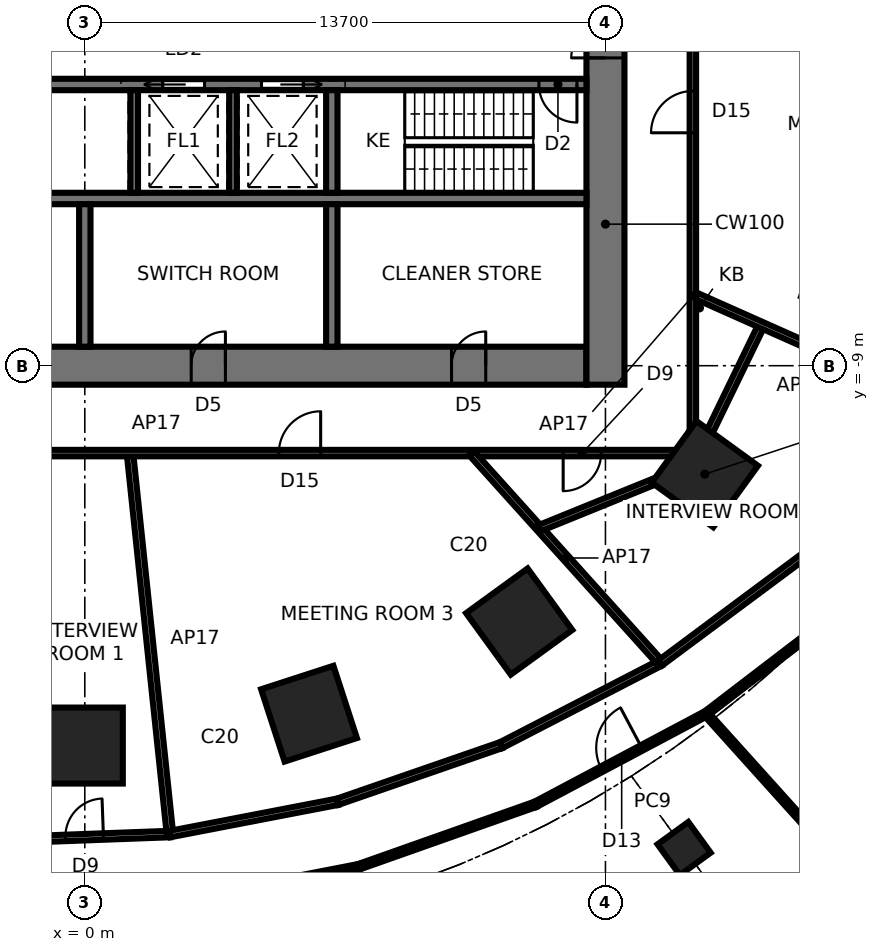
"""IFC4 building model, lengths in metres.
Left out: names, types, materials, properties, quantities, classifications, styles, units other than length and angle.
Written with IfcOpenShell. Run it as: python <this file> out.ifc"""

import sys

from ifc_helpers import new_model, si_unit, direction, frame, frame_2d, origin, origin_2d, place, context, subcontext, project, spatial, rectangle, extrude, element, fill, save


model = new_model("IFC4")
c1 = context("Model", 3, precision=1e-05, world=origin(), true_north=direction((0.0, 1.0)))
c2 = subcontext(c1, "Body", "Model", "MODEL_VIEW")
j1 = project(units=[si_unit("LENGTHUNIT", "METRE"), si_unit("PLANEANGLEUNIT", "RADIAN")], contexts=[c1])
p1 = place(None, origin())
s1 = spatial("IfcSite", under=j1, at=p1, CompositionType="ELEMENT")
p2 = place(p1, origin())
s2 = spatial("IfcBuilding", under=s1, at=p2, CompositionType="ELEMENT")
p3 = place(p2, frame((0.0, 0.0, 5.6)))
s3 = spatial("IfcBuildingStorey", under=s2, at=p3, CompositionType="ELEMENT", Elevation=5.6)
for number, where, z_axis, x_axis in (
    (1, (0.0, -18.996, 0.0), (0.0, 0.0, 1.0), (0.0, -1.0, 0.0)),
    (2, (5.9, -18.157, 0.0), (0.0, 0.0, 1.0), (0.309, -0.951, 0.0)),
    (3, (11.43, -15.733, 0.0), (0.0, 0.0, 1.0), (0.588, -0.809, 0.0)),
    (4, (16.315, -11.854, 0.0), (0.0, 0.0, 1.0), (0.809, -0.588, 0.0)),
):
    element("IfcColumn", number, at=place(p3, frame(where, z_axis=z_axis, x_axis=x_axis)), inside=s3, PredefinedType="COLUMN", context=c2, shape_type="SweptSolid", body=[
        extrude(rectangle(XDim=2.0, YDim=2.0, at=origin_2d()), origin(), (0.0, 0.0, 1.0), 5.0),
    ])
p4 = place(p3, frame((15.77, -21.705, 0.0), z_axis=(0.0, 0.0, 1.0), x_axis=(0.587785252292, -0.809016994375, 0.0)))
e5 = element("IfcColumn", 5, at=p4, inside=s3, PredefinedType="COLUMN", context=c2, shape_type="SweptSolid", body=[
    extrude(rectangle(XDim=1.0, YDim=1.0, at=origin_2d()), origin(), (0.0, 0.0, 1.0), 5.0),
])
p5 = place(p3, frame((-13.2, -9.0, 0.0), z_axis=(0.0, 0.0, 1.0), x_axis=(1.0, 0.0, 0.0)))
e6 = element("IfcWall", 6, at=p5, inside=s3, PredefinedType="SHEAR", context=c2, shape_type="SweptSolid", body=[
    extrude(rectangle(XDim=26.4, YDim=1.0, at=frame_2d((13.2, 0.0))), origin(), (0.0, 0.0, 1.0), 5.0),
])
p6 = place(p5, frame((0.2, 0.0, 0.0)))
e7 = element("IfcOpeningElement", 7, at=p6, cuts=e6, PredefinedType="OPENING", context=c2, shape_type="SweptSolid", body=[
    extrude(rectangle(XDim=1.0, YDim=2.1, at=frame_2d((0.5, 1.05))), frame((0.0, 0.51, 0.0), z_axis=(0.0, -1.0, 0.0), x_axis=(1.0, 0.0, 0.0)), (0.0, 0.0, 1.0), 1.02),
])
p7 = place(p5, frame((9.5, 0.0, 0.0)))
e8 = element("IfcOpeningElement", 8, at=p7, cuts=e6, PredefinedType="OPENING", context=c2, shape_type="SweptSolid", body=[
    extrude(rectangle(XDim=0.9, YDim=2.1, at=frame_2d((0.45, 1.05))), frame((0.0, 0.51, 0.0), z_axis=(0.0, -1.0, 0.0), x_axis=(1.0, 0.0, 0.0)), (0.0, 0.0, 1.0), 1.02),
])
p8 = place(p5, frame((16.0, 0.0, 0.0)))
e9 = element("IfcOpeningElement", 9, at=p8, cuts=e6, PredefinedType="OPENING", context=c2, shape_type="SweptSolid", body=[
    extrude(rectangle(XDim=0.9, YDim=2.1, at=frame_2d((0.45, 1.05))), frame((0.0, 0.51, 0.0), z_axis=(0.0, -1.0, 0.0), x_axis=(1.0, 0.0, 0.0)), (0.0, 0.0, 1.0), 1.02),
])
p9 = place(p5, frame((22.85, 0.0, 0.0)))
e10 = element("IfcOpeningElement", 10, at=p9, cuts=e6, PredefinedType="OPENING", context=c2, shape_type="SweptSolid", body=[
    extrude(rectangle(XDim=0.9, YDim=2.1, at=frame_2d((0.45, 1.05))), frame((0.0, 0.51, 0.0), z_axis=(0.0, -1.0, 0.0), x_axis=(1.0, 0.0, 0.0)), (0.0, 0.0, 1.0), 1.02),
])
p10 = place(p3, frame((13.7, -9.5, 0.0), z_axis=(0.0, 0.0, 1.0), x_axis=(0.0, 1.0, 0.0)))
e11 = element("IfcWall", 11, at=p10, inside=s3, PredefinedType="SHEAR", context=c2, shape_type="SweptSolid", body=[
    extrude(rectangle(XDim=19.0, YDim=1.0, at=frame_2d((9.5, 0.0))), origin(), (0.0, 0.0, 1.0), 5.0),
])
p11 = place(p10, frame((8.6, 0.0, 0.0)))
e12 = element("IfcOpeningElement", 12, at=p11, cuts=e11, PredefinedType="OPENING", context=c2, shape_type="SweptSolid", body=[
    extrude(rectangle(XDim=1.8, YDim=2.4, at=frame_2d((0.9, 1.2))), frame((0.0, 0.51, 0.0), z_axis=(0.0, -1.0, 0.0), x_axis=(1.0, 0.0, 0.0)), (0.0, 0.0, 1.0), 1.02),
])
p12 = place(p3, frame((-13.2, -1.6, 0.0), z_axis=(0.0, 0.0, 1.0), x_axis=(1.0, 0.0, 0.0)))
e13 = element("IfcWall", 13, at=p12, inside=s3, PredefinedType="SHEAR", context=c2, shape_type="SweptSolid", body=[
    extrude(rectangle(XDim=26.4, YDim=0.3, at=frame_2d((13.2, 0.0))), origin(), (0.0, 0.0, 1.0), 5.0),
])
p13 = place(p12, frame((25.15, 0.0, 0.0)))
e14 = element("IfcOpeningElement", 14, at=p13, cuts=e13, PredefinedType="OPENING", context=c2, shape_type="SweptSolid", body=[
    extrude(rectangle(XDim=1.0, YDim=2.1, at=frame_2d((0.5, 1.05))), frame((0.0, 0.16, 0.0), z_axis=(0.0, -1.0, 0.0), x_axis=(1.0, 0.0, 0.0)), (0.0, 0.0, 1.0), 0.32),
])
p14 = place(p12, frame((15.25, 0.0, 0.0)))
e15 = element("IfcOpeningElement", 15, at=p14, cuts=e13, PredefinedType="OPENING", context=c2, shape_type="SweptSolid", body=[
    extrude(rectangle(XDim=1.1, YDim=2.3, at=frame_2d((0.55, 1.15))), frame((0.0, 0.16, 0.0), z_axis=(0.0, -1.0, 0.0), x_axis=(1.0, 0.0, 0.0)), (0.0, 0.0, 1.0), 0.32),
])
p15 = place(p12, frame((17.85, 0.0, 0.0)))
e16 = element("IfcOpeningElement", 16, at=p15, cuts=e13, PredefinedType="OPENING", context=c2, shape_type="SweptSolid", body=[
    extrude(rectangle(XDim=1.1, YDim=2.3, at=frame_2d((0.55, 1.15))), frame((0.0, 0.16, 0.0), z_axis=(0.0, -1.0, 0.0), x_axis=(1.0, 0.0, 0.0)), (0.0, 0.0, 1.0), 0.32),
])
p16 = place(p12, frame((5.55, 0.0, 0.0)))
e17 = element("IfcOpeningElement", 17, at=p16, cuts=e13, PredefinedType="OPENING", context=c2, shape_type="SweptSolid", body=[
    extrude(rectangle(XDim=0.9, YDim=2.1, at=frame_2d((0.45, 1.05))), frame((0.0, 0.16, 0.0), z_axis=(0.0, -1.0, 0.0), x_axis=(1.0, 0.0, 0.0)), (0.0, 0.0, 1.0), 0.32),
])
p17 = place(p3, frame((-13.2, -4.6, 0.0), z_axis=(0.0, 0.0, 1.0), x_axis=(1.0, 0.0, 0.0)))
e18 = element("IfcWall", 18, at=p17, inside=s3, PredefinedType="SHEAR", context=c2, shape_type="SweptSolid", body=[
    extrude(rectangle(XDim=26.4, YDim=0.3, at=frame_2d((13.2, 0.0))), origin(), (0.0, 0.0, 1.0), 5.0),
])
p18 = place(p3, frame((6.5, -1.75, 0.0), z_axis=(0.0, 0.0, 1.0), x_axis=(0.0, -1.0, 0.0)))
e19 = element("IfcWall", 19, at=p18, inside=s3, PredefinedType="SHEAR", context=c2, shape_type="SweptSolid", body=[
    extrude(rectangle(XDim=2.7, YDim=0.3, at=frame_2d((1.35, 0.0))), origin(), (0.0, 0.0, 1.0), 5.0),
])
p19 = place(p3, frame((6.5, -4.75, 0.0), z_axis=(0.0, 0.0, 1.0), x_axis=(0.0, -1.0, 0.0)))
e20 = element("IfcWall", 20, at=p19, inside=s3, PredefinedType="SHEAR", context=c2, shape_type="SweptSolid", body=[
    extrude(rectangle(XDim=3.75, YDim=0.3, at=frame_2d((1.875, 0.0))), origin(), (0.0, 0.0, 1.0), 5.0),
])
for number, where, z_axis, x_axis in (
    (21, (1.3, -1.75, 0.0), (0.0, 0.0, 1.0), (0.0, -1.0, 0.0)),
    (22, (3.9, -1.75, 0.0), (0.0, 0.0, 1.0), (0.0, -1.0, 0.0)),
):
    element("IfcWall", number, at=place(p3, frame(where, z_axis=z_axis, x_axis=x_axis)), inside=s3, PredefinedType="SHEAR", context=c2, shape_type="SweptSolid", body=[
        extrude(rectangle(XDim=2.7, YDim=0.2, at=frame_2d((1.35, 0.0))), origin(), (0.0, 0.0, 1.0), 5.0),
    ])
p20 = place(p3, frame((0.0, -4.75, 0.0), z_axis=(0.0, 0.0, 1.0), x_axis=(0.0, -1.0, 0.0)))
e23 = element("IfcWall", 23, at=p20, inside=s3, PredefinedType="SHEAR", context=c2, shape_type="SweptSolid", body=[
    extrude(rectangle(XDim=3.75, YDim=0.3, at=frame_2d((1.875, 0.0))), origin(), (0.0, 0.0, 1.0), 5.0),
])
p21 = place(p3, frame((2.241, -21.325, 0.0), z_axis=(0.0, 0.0, 1.0), x_axis=(-0.999316169957, -0.03697556575, 0.0)))
e24 = element("IfcWall", 24, at=p21, inside=s3, PredefinedType="PARTITIONING", context=c2, shape_type="SweptSolid", body=[
    extrude(rectangle(XDim=4.503, YDim=0.17, at=frame_2d((2.251, 0.0))), origin(), (0.0, 0.0, 1.0), 4.8),
])
p22 = place(p21, frame((1.752, 0.0, 0.0)))
e25 = element("IfcOpeningElement", 25, at=p22, cuts=e24, PredefinedType="OPENING", context=c2, shape_type="SweptSolid", body=[
    extrude(rectangle(XDim=1.0, YDim=2.4, at=frame_2d((0.5, 1.2))), frame((0.0, 0.095, 0.0), z_axis=(0.0, -1.0, 0.0), x_axis=(1.0, 0.0, 0.0)), (0.0, 0.0, 1.0), 0.19),
])
p23 = place(p3, frame((1.188, -11.3, 0.0), z_axis=(0.0, 0.0, 1.0), x_axis=(0.104512053293, -0.994523619989, 0.0)))
e26 = element("IfcWall", 26, at=p23, inside=s3, PredefinedType="PARTITIONING", context=c2, shape_type="SweptSolid", body=[
    extrude(rectangle(XDim=10.08, YDim=0.17, at=frame_2d((5.04, 0.0))), origin(), (0.0, 0.0, 1.0), 4.8),
])
p24 = place(p3, frame((2.429, -23.115, 0.0), z_axis=(0.0, 0.0, 1.0), x_axis=(0.981647737098, 0.190703225592, 0.0)))
e27 = element("IfcWall", 27, at=p24, inside=s3, PredefinedType="PARTITIONING", context=c2, shape_type="SweptSolid", body=[
    extrude(rectangle(XDim=4.869, YDim=0.15, at=frame_2d((2.434, 0.0))), origin(), (0.0, 0.0, 1.0), 4.8),
])
p25 = place(p3, frame((6.653, -20.475, 0.0), z_axis=(0.0, 0.0, 1.0), x_axis=(-0.981933890717, -0.189224296169, 0.0)))
e28 = element("IfcWall", 28, at=p25, inside=s3, PredefinedType="PARTITIONING", context=c2, shape_type="SweptSolid", body=[
    extrude(rectangle(XDim=4.492, YDim=0.17, at=frame_2d((2.246, 0.0))), origin(), (0.0, 0.0, 1.0), 4.8),
])
p26 = place(p3, frame((7.209, -22.187, 0.0), z_axis=(0.0, 0.0, 1.0), x_axis=(0.94280197492, 0.333353320197, 0.0)))
e29 = element("IfcWall", 29, at=p26, inside=s3, PredefinedType="PARTITIONING", context=c2, shape_type="SweptSolid", body=[
    extrude(rectangle(XDim=4.933, YDim=0.15, at=frame_2d((2.467, 0.0))), origin(), (0.0, 0.0, 1.0), 4.8),
])
p27 = place(p3, frame((10.96, -18.983, 0.0), z_axis=(0.0, 0.0, 1.0), x_axis=(-0.944956141071, -0.327197022377, 0.0)))
e30 = element("IfcWall", 30, at=p27, inside=s3, PredefinedType="PARTITIONING", context=c2, shape_type="SweptSolid", body=[
    extrude(rectangle(XDim=4.558, YDim=0.17, at=frame_2d((2.279, 0.0))), origin(), (0.0, 0.0, 1.0), 4.8),
])
p28 = place(p3, frame((-1.188, -11.3, 0.0), z_axis=(0.0, 0.0, 1.0), x_axis=(1.0, 0.0, 0.0)))
e31 = element("IfcWall", 31, at=p28, inside=s3, PredefinedType="PARTITIONING", context=c2, shape_type="SweptSolid", body=[
    extrude(rectangle(XDim=17.188, YDim=0.17, at=frame_2d((8.594, 0.0))), origin(), (0.0, 0.0, 1.0), 4.8),
])
p29 = place(p28, frame((6.294, 0.0, 0.0)))
e32 = element("IfcOpeningElement", 32, at=p29, cuts=e31, PredefinedType="OPENING", context=c2, shape_type="SweptSolid", body=[
    extrude(rectangle(XDim=1.1, YDim=2.4, at=frame_2d((0.55, 1.2))), frame((0.0, 0.095, 0.0), z_axis=(0.0, -1.0, 0.0), x_axis=(1.0, 0.0, 0.0)), (0.0, 0.0, 1.0), 0.19),
])
p30 = place(p28, frame((13.775, 0.0, 0.0)))
e33 = element("IfcOpeningElement", 33, at=p30, cuts=e31, PredefinedType="OPENING", context=c2, shape_type="SweptSolid", body=[
    extrude(rectangle(XDim=1.0, YDim=2.4, at=frame_2d((0.5, 1.2))), frame((0.0, 0.095, 0.0), z_axis=(0.0, -1.0, 0.0), x_axis=(1.0, 0.0, 0.0)), (0.0, 0.0, 1.0), 0.19),
])
p31 = place(p3, frame((11.86, -20.542, 0.0), z_axis=(0.0, 0.0, 1.0), x_axis=(0.883167950269, 0.469056895928, 0.0)))
e34 = element("IfcWall", 34, at=p31, inside=s3, PredefinedType="PARTITIONING", context=c2, shape_type="SweptSolid", body=[
    extrude(rectangle(XDim=5.083, YDim=0.15, at=frame_2d((2.542, 0.0))), origin(), (0.0, 0.0, 1.0), 4.8),
])
p32 = place(p31, frame((1.967, 0.0, 0.0)))
e35 = element("IfcOpeningElement", 35, at=p32, cuts=e34, PredefinedType="OPENING", context=c2, shape_type="SweptSolid", body=[
    extrude(rectangle(XDim=1.2, YDim=2.4, at=frame_2d((0.6, 1.2))), frame((0.0, 0.085, 0.0), z_axis=(0.0, -1.0, 0.0), x_axis=(1.0, 0.0, 0.0)), (0.0, 0.0, 1.0), 0.17),
])
p33 = place(p3, frame((15.145, -16.82, 0.0), z_axis=(0.0, 0.0, 1.0), x_axis=(-0.888324088064, -0.459217066935, 0.0)))
e36 = element("IfcWall", 36, at=p33, inside=s3, PredefinedType="PARTITIONING", context=c2, shape_type="SweptSolid", body=[
    extrude(rectangle(XDim=4.711, YDim=0.17, at=frame_2d((2.355, 0.0))), origin(), (0.0, 0.0, 1.0), 4.8),
])
p34 = place(p3, frame((23.406, -25.995, 0.0), z_axis=(0.0, 0.0, 1.0), x_axis=(-0.669133538754, 0.743142185126, 0.0)))
e37 = element("IfcWall", 37, at=p34, inside=s3, PredefinedType="PARTITIONING", context=c2, shape_type="SweptSolid", body=[
    extrude(rectangle(XDim=10.546, YDim=0.15, at=frame_2d((5.273, 0.0))), origin(), (0.0, 0.0, 1.0), 4.8),
])
p35 = place(p3, frame((10.175, -11.3, 0.0), z_axis=(0.0, 0.0, 1.0), x_axis=(0.669144492072, -0.74313232249, 0.0)))
e38 = element("IfcWall", 38, at=p35, inside=s3, PredefinedType="PARTITIONING", context=c2, shape_type="SweptSolid", body=[
    extrude(rectangle(XDim=7.428, YDim=0.17, at=frame_2d((3.714, 0.0))), origin(), (0.0, 0.0, 1.0), 4.8),
])
p36 = place(p3, frame((16.349, -18.158, 0.0), z_axis=(0.0, 0.0, 1.0), x_axis=(0.793951005075, 0.607981744414, 0.0)))
e39 = element("IfcWall", 39, at=p36, inside=s3, PredefinedType="PARTITIONING", context=c2, shape_type="SweptSolid", body=[
    extrude(rectangle(XDim=5.3, YDim=0.15, at=frame_2d((2.65, 0.0))), origin(), (0.0, 0.0, 1.0), 4.8),
])
p37 = place(p3, frame((19.101, -13.877, 0.0), z_axis=(0.0, 0.0, 1.0), x_axis=(-0.802376605187, -0.596818048862, 0.0)))
e40 = element("IfcWall", 40, at=p37, inside=s3, PredefinedType="PARTITIONING", context=c2, shape_type="SweptSolid", body=[
    extrude(rectangle(XDim=4.93, YDim=0.17, at=frame_2d((2.465, 0.0))), origin(), (0.0, 0.0, 1.0), 4.8),
])
p38 = place(p3, frame((16.01, -11.632, 0.0), z_axis=(0.0, 0.0, 1.0), x_axis=(-0.926462321179, -0.376387522955, 0.0)))
e41 = element("IfcWall", 41, at=p38, inside=s3, PredefinedType="PARTITIONING", context=c2, shape_type="SweptSolid", body=[
    extrude(rectangle(XDim=4.376, YDim=0.17, at=frame_2d((2.188, 0.0))), origin(), (0.0, 0.0, 1.0), 4.8),
])
p39 = place(p3, frame((17.808, -7.929, 0.0), z_axis=(0.0, 0.0, 1.0), x_axis=(-0.436602321688, -0.899654607445, 0.0)))
e42 = element("IfcWall", 42, at=p39, inside=s3, PredefinedType="PARTITIONING", context=c2, shape_type="SweptSolid", body=[
    extrude(rectangle(XDim=4.117, YDim=0.17, at=frame_2d((2.058, 0.0))), origin(), (0.0, 0.0, 1.0), 4.8),
])
p40 = place(p3, frame((22.548, -10.039, 0.0), z_axis=(0.0, 0.0, 1.0), x_axis=(-0.913552901279, 0.406719923982, 0.0)))
e43 = element("IfcWall", 43, at=p40, inside=s3, PredefinedType="PARTITIONING", context=c2, shape_type="SweptSolid", body=[
    extrude(rectangle(XDim=7.167, YDim=0.17, at=frame_2d((3.583, 0.0))), origin(), (0.0, 0.0, 1.0), 4.8),
])
p41 = place(p3, frame((16.0, -11.3, 0.0), z_axis=(0.0, 0.0, 1.0), x_axis=(0.0, 1.0, 0.0)))
e44 = element("IfcWall", 44, at=p41, inside=s3, PredefinedType="PARTITIONING", context=c2, shape_type="SweptSolid", body=[
    extrude(rectangle(XDim=13.781, YDim=0.17, at=frame_2d((6.89, 0.0))), origin(), (0.0, 0.0, 1.0), 4.8),
])
p42 = place(p41, frame((8.429, 0.0, 0.0)))
e45 = element("IfcOpeningElement", 45, at=p42, cuts=e44, PredefinedType="OPENING", context=c2, shape_type="SweptSolid", body=[
    extrude(rectangle(XDim=1.1, YDim=2.4, at=frame_2d((0.55, 1.2))), frame((0.0, 0.095, 0.0), z_axis=(0.0, -1.0, 0.0), x_axis=(1.0, 0.0, 0.0)), (0.0, 0.0, 1.0), 0.19),
])
p43 = place(p11, origin())
e46 = element("IfcDoor", 46, at=p43, inside=s3, OperationType="DOUBLE_DOOR_SINGLE_SWING", PredefinedType="DOOR", context=c2, shape_type="SweptSolid", body=[
    extrude(rectangle(XDim=1.72, YDim=2.36, at=frame_2d((0.9, 1.18))), frame((0.0, 0.025, 0.0), z_axis=(0.0, -1.0, 0.0), x_axis=(1.0, 0.0, 0.0)), (0.0, 0.0, 1.0), 0.05),
    extrude(rectangle(XDim=0.04, YDim=2.4, at=frame_2d((0.02, 1.2))), frame((0.0, 0.25, 0.0), z_axis=(0.0, -1.0, 0.0), x_axis=(1.0, 0.0, 0.0)), (0.0, 0.0, 1.0), 0.5),
    extrude(rectangle(XDim=0.04, YDim=2.4, at=frame_2d((1.78, 1.2))), frame((0.0, 0.25, 0.0), z_axis=(0.0, -1.0, 0.0), x_axis=(1.0, 0.0, 0.0)), (0.0, 0.0, 1.0), 0.5),
    extrude(rectangle(XDim=1.72, YDim=0.04, at=frame_2d((0.9, 2.38))), frame((0.0, 0.25, 0.0), z_axis=(0.0, -1.0, 0.0), x_axis=(1.0, 0.0, 0.0)), (0.0, 0.0, 1.0), 0.5),
])
fill(e12, e46)
p44 = place(p13, frame((1.0, 0.0, 0.0), z_axis=(0.0, 0.0, 1.0), x_axis=(-1.0, 0.0, 0.0)))
e47 = element("IfcDoor", 47, at=p44, inside=s3, OperationType="SINGLE_SWING_LEFT", PredefinedType="DOOR", context=c2, shape_type="SweptSolid", body=[
    extrude(rectangle(XDim=1.0, YDim=2.1, at=frame_2d((0.5, 1.05))), frame((0.0, 0.025, 0.0), z_axis=(0.0, -1.0, 0.0), x_axis=(1.0, 0.0, 0.0)), (0.0, 0.0, 1.0), 0.05),
])
fill(e14, e47)
p45 = place(p14, frame((1.1, 0.0, 0.0), z_axis=(0.0, 0.0, 1.0), x_axis=(-1.0, 0.0, 0.0)))
e48 = element("IfcDoor", 48, at=p45, inside=s3, OperationType="SLIDING_TO_RIGHT", PredefinedType="DOOR", context=c2, shape_type="SweptSolid", body=[
    extrude(rectangle(XDim=1.1, YDim=2.3, at=frame_2d((0.55, 1.15))), frame((0.0, 0.025, 0.0), z_axis=(0.0, -1.0, 0.0), x_axis=(1.0, 0.0, 0.0)), (0.0, 0.0, 1.0), 0.05),
])
fill(e15, e48)
p46 = place(p15, frame((1.1, 0.0, 0.0), z_axis=(0.0, 0.0, 1.0), x_axis=(-1.0, 0.0, 0.0)))
e49 = element("IfcDoor", 49, at=p46, inside=s3, OperationType="SLIDING_TO_LEFT", PredefinedType="DOOR", context=c2, shape_type="SweptSolid", body=[
    extrude(rectangle(XDim=1.1, YDim=2.3, at=frame_2d((0.55, 1.15))), frame((0.0, 0.025, 0.0), z_axis=(0.0, -1.0, 0.0), x_axis=(1.0, 0.0, 0.0)), (0.0, 0.0, 1.0), 0.05),
])
fill(e16, e49)
p47 = place(p8, origin())
e50 = element("IfcDoor", 50, at=p47, inside=s3, OperationType="SINGLE_SWING_RIGHT", PredefinedType="DOOR", context=c2, shape_type="SweptSolid", body=[
    extrude(rectangle(XDim=0.82, YDim=2.06, at=frame_2d((0.45, 1.03))), frame((0.0, 0.025, 0.0), z_axis=(0.0, -1.0, 0.0), x_axis=(1.0, 0.0, 0.0)), (0.0, 0.0, 1.0), 0.05),
    extrude(rectangle(XDim=0.04, YDim=2.1, at=frame_2d((0.02, 1.05))), frame((0.0, 0.25, 0.0), z_axis=(0.0, -1.0, 0.0), x_axis=(1.0, 0.0, 0.0)), (0.0, 0.0, 1.0), 0.5),
    extrude(rectangle(XDim=0.04, YDim=2.1, at=frame_2d((0.88, 1.05))), frame((0.0, 0.25, 0.0), z_axis=(0.0, -1.0, 0.0), x_axis=(1.0, 0.0, 0.0)), (0.0, 0.0, 1.0), 0.5),
    extrude(rectangle(XDim=0.82, YDim=0.04, at=frame_2d((0.45, 2.08))), frame((0.0, 0.25, 0.0), z_axis=(0.0, -1.0, 0.0), x_axis=(1.0, 0.0, 0.0)), (0.0, 0.0, 1.0), 0.5),
])
fill(e9, e50)
p48 = place(p9, origin())
e51 = element("IfcDoor", 51, at=p48, inside=s3, OperationType="SINGLE_SWING_RIGHT", PredefinedType="DOOR", context=c2, shape_type="SweptSolid", body=[
    extrude(rectangle(XDim=0.82, YDim=2.06, at=frame_2d((0.45, 1.03))), frame((0.0, 0.025, 0.0), z_axis=(0.0, -1.0, 0.0), x_axis=(1.0, 0.0, 0.0)), (0.0, 0.0, 1.0), 0.05),
    extrude(rectangle(XDim=0.04, YDim=2.1, at=frame_2d((0.02, 1.05))), frame((0.0, 0.25, 0.0), z_axis=(0.0, -1.0, 0.0), x_axis=(1.0, 0.0, 0.0)), (0.0, 0.0, 1.0), 0.5),
    extrude(rectangle(XDim=0.04, YDim=2.1, at=frame_2d((0.88, 1.05))), frame((0.0, 0.25, 0.0), z_axis=(0.0, -1.0, 0.0), x_axis=(1.0, 0.0, 0.0)), (0.0, 0.0, 1.0), 0.5),
    extrude(rectangle(XDim=0.82, YDim=0.04, at=frame_2d((0.45, 2.08))), frame((0.0, 0.25, 0.0), z_axis=(0.0, -1.0, 0.0), x_axis=(1.0, 0.0, 0.0)), (0.0, 0.0, 1.0), 0.5),
])
fill(e10, e51)
p49 = place(p22, frame((1.0, 0.0, 0.0), z_axis=(0.0, 0.0, 1.0), x_axis=(-1.0, 0.0, 0.0)))
e52 = element("IfcDoor", 52, at=p49, inside=s3, OperationType="SINGLE_SWING_RIGHT", PredefinedType="DOOR", context=c2, shape_type="SweptSolid", body=[
    extrude(rectangle(XDim=1.0, YDim=2.4, at=frame_2d((0.5, 1.2))), frame((0.0, 0.025, 0.0), z_axis=(0.0, -1.0, 0.0), x_axis=(1.0, 0.0, 0.0)), (0.0, 0.0, 1.0), 0.05),
])
fill(e25, e52)
p50 = place(p29, origin())
e53 = element("IfcDoor", 53, at=p50, inside=s3, OperationType="SINGLE_SWING_RIGHT", PredefinedType="DOOR", context=c2, shape_type="SweptSolid", body=[
    extrude(rectangle(XDim=1.1, YDim=2.4, at=frame_2d((0.55, 1.2))), frame((0.0, 0.025, 0.0), z_axis=(0.0, -1.0, 0.0), x_axis=(1.0, 0.0, 0.0)), (0.0, 0.0, 1.0), 0.05),
])
fill(e32, e53)
p51 = place(p42, origin())
e54 = element("IfcDoor", 54, at=p51, inside=s3, OperationType="SINGLE_SWING_LEFT", PredefinedType="DOOR", context=c2, shape_type="SweptSolid", body=[
    extrude(rectangle(XDim=1.1, YDim=2.4, at=frame_2d((0.55, 1.2))), frame((0.0, 0.025, 0.0), z_axis=(0.0, -1.0, 0.0), x_axis=(1.0, 0.0, 0.0)), (0.0, 0.0, 1.0), 0.05),
])
fill(e45, e54)
p52 = place(p30, frame((1.0, 0.0, 0.0), z_axis=(0.0, 0.0, 1.0), x_axis=(-1.0, 0.0, 0.0)))
e55 = element("IfcDoor", 55, at=p52, inside=s3, OperationType="SINGLE_SWING_RIGHT", PredefinedType="DOOR", context=c2, shape_type="SweptSolid", body=[
    extrude(rectangle(XDim=1.0, YDim=2.4, at=frame_2d((0.5, 1.2))), frame((0.0, 0.025, 0.0), z_axis=(0.0, -1.0, 0.0), x_axis=(1.0, 0.0, 0.0)), (0.0, 0.0, 1.0), 0.05),
])
fill(e33, e55)
p53 = place(p32, origin())
e56 = element("IfcDoor", 56, at=p53, inside=s3, OperationType="SINGLE_SWING_RIGHT", PredefinedType="DOOR", context=c2, shape_type="SweptSolid", body=[
    extrude(rectangle(XDim=1.2, YDim=2.4, at=frame_2d((0.6, 1.2))), frame((0.0, 0.025, 0.0), z_axis=(0.0, -1.0, 0.0), x_axis=(1.0, 0.0, 0.0)), (0.0, 0.0, 1.0), 0.05),
])
fill(e35, e56)
save(model, sys.argv[1])
